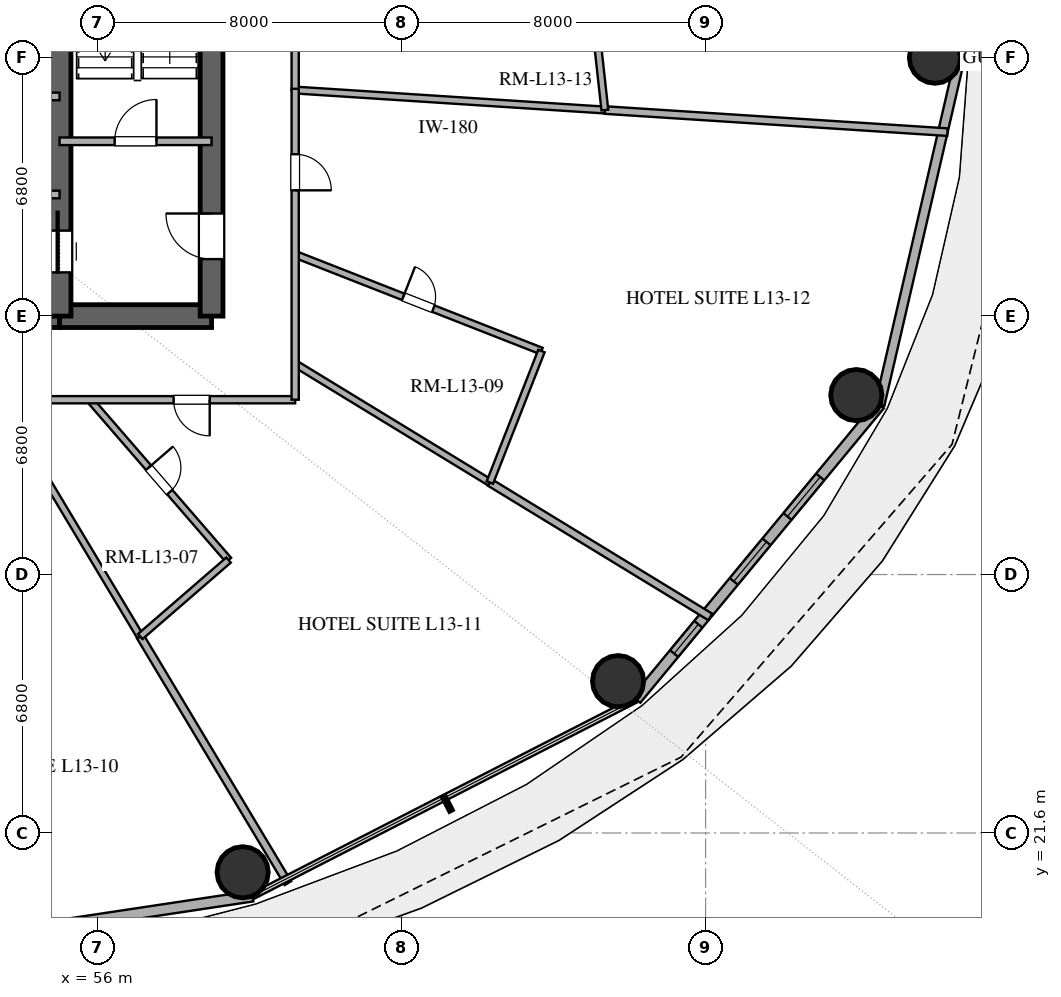
"""IFC4 building model, lengths in metres.
Left out: names, types, materials, properties, quantities, classifications, styles, units other than length and angle.
Written with IfcOpenShell. Run it as: python <this file> out.ifc"""

import sys

from ifc_helpers import new_model, si_unit, direction, frame, frame_2d, origin, origin_2d, place, context, subcontext, project, spatial, rectangle, hollow_circle, extrude, element, fill, save


model = new_model("IFC4")
c1 = context("Model", 3, precision=1e-05, world=origin(), true_north=direction((0.0, 1.0)))
c2 = subcontext(c1, "Body", "Model", "MODEL_VIEW")
j1 = project(units=[si_unit("LENGTHUNIT", "METRE"), si_unit("PLANEANGLEUNIT", "RADIAN")], contexts=[c1])
p1 = place(None, origin())
s1 = spatial("IfcSite", under=j1, at=p1, CompositionType="ELEMENT")
p2 = place(p1, origin())
s2 = spatial("IfcBuilding", under=s1, at=p2, CompositionType="ELEMENT")
p3 = place(p2, frame((0.0, 0.0, 57.0)))
s3 = spatial("IfcBuildingStorey", under=s2, at=p3, CompositionType="ELEMENT", Elevation=57.0)
p4 = place(p3, frame((41.0, 35.2, 0.0), z_axis=(0.0, 0.0, 1.0), x_axis=(1.0, 0.0, 0.0)))
e1 = element("IfcWall", 1, at=p4, inside=s3, PredefinedType="SHEAR", context=c2, shape_type="SweptSolid", body=[
    extrude(rectangle(XDim=14.0, YDim=0.6, at=frame_2d((7.0, 0.0))), origin(), (0.0, 0.0, 1.0), 3.38),
])
p5 = place(p4, frame((6.1, 0.0, 0.0)))
e2 = element("IfcOpeningElement", 2, at=p5, cuts=e1, PredefinedType="OPENING", context=c2, shape_type="SweptSolid", body=[
    extrude(rectangle(XDim=1.8, YDim=2.25, at=frame_2d((0.9, 1.125))), frame((0.0, 0.31, 0.0), z_axis=(0.0, -1.0, 0.0), x_axis=(1.0, 0.0, 0.0)), (0.0, 0.0, 1.0), 0.62),
])
p6 = place(p3, frame((55.0, 35.2, 0.0), z_axis=(0.0, 0.0, 1.0), x_axis=(1.0, 0.0, 0.0)))
e3 = element("IfcWall", 3, at=p6, inside=s3, PredefinedType="SHEAR", context=c2, shape_type="SweptSolid", body=[
    extrude(rectangle(XDim=4.0, YDim=0.6, at=frame_2d((2.0, 0.0))), origin(), (0.0, 0.0, 1.0), 3.38),
])
p7 = place(p3, frame((59.0, 35.2, 0.0), z_axis=(0.0, 0.0, 1.0), x_axis=(0.0, 1.0, 0.0)))
e4 = element("IfcWall", 4, at=p7, inside=s3, PredefinedType="SHEAR", context=c2, shape_type="SweptSolid", body=[
    extrude(rectangle(XDim=13.6, YDim=0.6, at=frame_2d((6.8, 0.0))), origin(), (0.0, 0.0, 1.0), 3.38),
])
p8 = place(p7, frame((1.5, 0.0, 0.0)))
e5 = element("IfcOpeningElement", 5, at=p8, cuts=e4, PredefinedType="OPENING", context=c2, shape_type="SweptSolid", body=[
    extrude(rectangle(XDim=1.2, YDim=2.15, at=frame_2d((0.6, 1.075))), frame((0.0, 0.31, 0.0), z_axis=(0.0, -1.0, 0.0), x_axis=(1.0, 0.0, 0.0)), (0.0, 0.0, 1.0), 0.62),
])
p9 = place(p3, frame((55.0, 35.2, 0.0), z_axis=(0.0, 0.0, 1.0), x_axis=(0.0, 1.0, 0.0)))
e6 = element("IfcWall", 6, at=p9, inside=s3, PredefinedType="SHEAR", context=c2, shape_type="SweptSolid", body=[
    extrude(rectangle(XDim=13.6, YDim=0.6, at=frame_2d((6.8, 0.0))), origin(), (0.0, 0.0, 1.0), 3.38),
])
p10 = place(p9, frame((1.15, 0.0, 0.0)))
e7 = element("IfcOpeningElement", 7, at=p10, cuts=e6, PredefinedType="OPENING", context=c2, shape_type="SweptSolid", body=[
    extrude(rectangle(XDim=1.1, YDim=2.2, at=frame_2d((0.55, 1.1))), frame((0.0, 0.31, 0.0), z_axis=(0.0, -1.0, 0.0), x_axis=(1.0, 0.0, 0.0)), (0.0, 0.0, 1.0), 0.62),
])
for number, where, z_axis, x_axis in (
    (8, (78.035, 42.0, 0.0), (0.0, 0.0, 1.0), (1.0, 0.0, 0.0)),
    (9, (59.818, 20.566, 0.0), (0.0, 0.0, 1.0), (1.0, 0.0, 0.0)),
    (10, (69.697, 25.595, 0.0), (0.0, 0.0, 1.0), (1.0, 0.0, 0.0)),
    (11, (75.966, 33.122, 0.0), (0.0, 0.0, 1.0), (1.0, 0.0, 0.0)),
):
    element("IfcColumn", number, at=place(p3, frame(where, z_axis=z_axis, x_axis=x_axis)), inside=s3, PredefinedType="COLUMN", context=c2, shape_type="SweptSolid", body=[
        extrude(hollow_circle(Radius=0.675, WallThickness=0.036, at=origin_2d()), origin(), (0.0, 0.0, 1.0), 3.38),
    ])
p11 = place(p3, frame((78.696, 42.0, 0.0), z_axis=(0.0, 0.0, 1.0), x_axis=(-0.225454452941, 0.974253709076, 0.0)))
e12 = element("IfcWall", 12, at=p11, inside=s3, PredefinedType="SOLIDWALL", context=c2, shape_type="SweptSolid", body=[
    extrude(rectangle(XDim=9.38, YDim=0.28, at=frame_2d((4.69, 0.0))), origin(), (0.0, 0.0, 1.0), 3.38),
])
p12 = place(p11, frame((6.435, 0.0, 0.0)))
e13 = element("IfcOpeningElement", 13, at=p12, cuts=e12, PredefinedType="OPENING", context=c2, shape_type="SweptSolid", body=[
    extrude(rectangle(XDim=1.4, YDim=2.2, at=frame_2d((0.7, 1.1))), frame((0.0, 0.15, 0.0), z_axis=(0.0, -1.0, 0.0), x_axis=(1.0, 0.0, 0.0)), (0.0, 0.0, 1.0), 0.3),
])
p13 = place(p3, frame((48.0, 18.12, 0.0), z_axis=(0.0, 0.0, 1.0), x_axis=(0.988864835849, 0.148816452121, 0.0)))
e14 = element("IfcWall", 14, at=p13, inside=s3, PredefinedType="SOLIDWALL", context=c2, shape_type="SweptSolid", body=[
    extrude(rectangle(XDim=12.214, YDim=0.28, at=frame_2d((6.107, 0.0))), origin(), (0.0, 0.0, 1.0), 3.38),
])
p14 = place(p13, frame((1.621, 0.0, 0.0)))
e15 = element("IfcOpeningElement", 15, at=p14, cuts=e14, PredefinedType="OPENING", context=c2, shape_type="SweptSolid", body=[
    extrude(rectangle(XDim=1.6, YDim=2.25, at=frame_2d((0.8, 1.125))), frame((0.0, 0.15, 0.0), z_axis=(0.0, -1.0, 0.0), x_axis=(1.0, 0.0, 0.0)), (0.0, 0.0, 1.0), 0.3),
])
p15 = place(p3, frame((70.174, 25.114, 0.0), z_axis=(0.0, 0.0, 1.0), x_axis=(0.637296809613, 0.770618437657, 0.0)))
e16 = element("IfcWall", 16, at=p15, inside=s3, PredefinedType="SOLIDWALL", context=c2, shape_type="SweptSolid", body=[
    extrude(rectangle(XDim=10.053, YDim=0.28, at=frame_2d((5.027, 0.0))), origin(), (0.0, 0.0, 1.0), 3.38),
])
p16 = place(p15, frame((1.565, 0.0, 0.85)))
e17 = element("IfcOpeningElement", 17, at=p16, cuts=e16, PredefinedType="OPENING", context=c2, shape_type="SweptSolid", body=[
    extrude(rectangle(XDim=1.0, YDim=1.8, at=frame_2d((0.5, 0.9))), frame((0.0, 0.15, 0.0), z_axis=(0.0, -1.0, 0.0), x_axis=(1.0, 0.0, 0.0)), (0.0, 0.0, 1.0), 0.3),
])
p17 = place(p15, frame((4.03, 0.0, 0.85)))
e18 = element("IfcOpeningElement", 18, at=p17, cuts=e16, PredefinedType="OPENING", context=c2, shape_type="SweptSolid", body=[
    extrude(rectangle(XDim=1.35, YDim=1.8, at=frame_2d((0.675, 0.9))), frame((0.0, 0.15, 0.0), z_axis=(0.0, -1.0, 0.0), x_axis=(1.0, 0.0, 0.0)), (0.0, 0.0, 1.0), 0.3),
])
p18 = place(p15, frame((6.246, 0.0, 0.85)))
e19 = element("IfcOpeningElement", 19, at=p18, cuts=e16, PredefinedType="OPENING", context=c2, shape_type="SweptSolid", body=[
    extrude(rectangle(XDim=1.35, YDim=1.8, at=frame_2d((0.675, 0.9))), frame((0.0, 0.15, 0.0), z_axis=(0.0, -1.0, 0.0), x_axis=(1.0, 0.0, 0.0)), (0.0, 0.0, 1.0), 0.3),
])
p19 = place(p3, frame((76.581, 32.862, 0.0), z_axis=(0.0, 0.0, 1.0), x_axis=(0.225454452941, 0.974253709076, 0.0)))
e20 = element("IfcWall", 20, at=p19, inside=s3, PredefinedType="SOLIDWALL", context=c2, shape_type="SweptSolid", body=[
    extrude(rectangle(XDim=9.38, YDim=0.25, at=frame_2d((4.69, 0.0))), origin(), (0.0, 0.0, 1.0), 3.38),
])
p20 = place(p3, frame((55.0, 39.8, 0.0), z_axis=(0.0, 0.0, 1.0), x_axis=(1.0, 0.0, 0.0)))
e21 = element("IfcWall", 21, at=p20, inside=s3, PredefinedType="SOLIDWALL", context=c2, shape_type="SweptSolid", body=[
    extrude(rectangle(XDim=4.0, YDim=0.2, at=frame_2d((2.0, 0.0))), origin(), (0.0, 0.0, 1.0), 2.74),
])
p21 = place(p20, frame((1.45, 0.0, 0.0)))
e22 = element("IfcOpeningElement", 22, at=p21, cuts=e21, PredefinedType="OPENING", context=c2, shape_type="SweptSolid", body=[
    extrude(rectangle(XDim=1.1, YDim=2.15, at=frame_2d((0.55, 1.075))), frame((0.0, 0.11, 0.0), z_axis=(0.0, -1.0, 0.0), x_axis=(1.0, 0.0, 0.0)), (0.0, 0.0, 1.0), 0.22),
])
for number, where, z_axis, x_axis in (
    (23, (52.05, 38.4, 0.0), (0.0, 0.0, 1.0), (1.0, 0.0, 0.0)),
    (24, (52.05, 40.98, 0.0), (0.0, 0.0, 1.0), (1.0, 0.0, 0.0)),
):
    element("IfcWall", number, at=place(p3, frame(where, z_axis=z_axis, x_axis=x_axis)), inside=s3, PredefinedType="SOLIDWALL", context=c2, shape_type="SweptSolid", body=[
        extrude(rectangle(XDim=2.95, YDim=0.2, at=frame_2d((1.475, 0.0))), origin(), (0.0, 0.0, 1.0), 2.74),
    ])
p22 = place(p3, frame((78.364, 40.041, 0.0), z_axis=(0.0, 0.0, 1.0), x_axis=(-0.997924020497, 0.064402246198, 0.0)))
e25 = element("IfcWall", 25, at=p22, inside=s3, PredefinedType="PARTITIONING", context=c2, shape_type="SweptSolid", body=[
    extrude(rectangle(XDim=9.034, YDim=0.2, at=frame_2d((4.517, 0.0))), origin(), (0.0, 0.0, 1.0), 2.74),
])
p23 = place(p3, frame((69.349, 40.622, 0.0), z_axis=(0.0, 0.0, 1.0), x_axis=(-0.997924317455, 0.064397644621, 0.0)))
e26 = element("IfcWall", 26, at=p23, inside=s3, PredefinedType="PLUMBINGWALL", context=c2, shape_type="SweptSolid", body=[
    extrude(rectangle(XDim=8.166, YDim=0.18, at=frame_2d((4.083, 0.0))), origin(), (0.0, 0.0, 1.0), 2.74),
])
p24 = place(p3, frame((61.01, 20.281, 0.0), z_axis=(0.0, 0.0, 1.0), x_axis=(-0.513892719639, 0.857854458928, 0.0)))
e27 = element("IfcWall", 27, at=p24, inside=s3, PredefinedType="PARTITIONING", context=c2, shape_type="SweptSolid", body=[
    extrude(rectangle(XDim=7.563, YDim=0.2, at=frame_2d((3.781, 0.0))), origin(), (0.0, 0.0, 1.0), 2.74),
])
p25 = place(p3, frame((57.124, 26.769, 0.0), z_axis=(0.0, 0.0, 1.0), x_axis=(-0.513872793929, 0.857866394994, 0.0)))
e28 = element("IfcWall", 28, at=p25, inside=s3, PredefinedType="PLUMBINGWALL", context=c2, shape_type="SweptSolid", body=[
    extrude(rectangle(XDim=7.263, YDim=0.18, at=frame_2d((3.632, 0.0))), origin(), (0.0, 0.0, 1.0), 2.74),
])
p26 = place(p3, frame((61.2, 36.823, 0.0), z_axis=(0.0, 0.0, 1.0), x_axis=(0.930954264603, -0.365135806539, 0.0)))
e29 = element("IfcWall", 29, at=p26, inside=s3, PredefinedType="PLUMBINGWALL", context=c2, shape_type="SweptSolid", body=[
    extrude(rectangle(XDim=6.961, YDim=0.18, at=frame_2d((3.48, 0.0))), origin(), (0.0, 0.0, 1.0), 2.74),
])
p27 = place(p26, frame((3.055, 0.0, 0.0)))
e30 = element("IfcOpeningElement", 30, at=p27, cuts=e29, PredefinedType="OPENING", context=c2, shape_type="SweptSolid", body=[
    extrude(rectangle(XDim=0.85, YDim=2.1, at=frame_2d((0.425, 1.05))), frame((0.0, 0.1, 0.0), z_axis=(0.0, -1.0, 0.0), x_axis=(1.0, 0.0, 0.0)), (0.0, 0.0, 1.0), 0.2),
])
p28 = place(p3, frame((72.123, 27.284, 0.0), z_axis=(0.0, 0.0, 1.0), x_axis=(-0.853686673388, 0.520786965735, 0.0)))
e31 = element("IfcWall", 31, at=p28, inside=s3, PredefinedType="PARTITIONING", context=c2, shape_type="SweptSolid", body=[
    extrude(rectangle(XDim=6.793, YDim=0.2, at=frame_2d((3.396, 0.0))), origin(), (0.0, 0.0, 1.0), 2.74),
])
p29 = place(p3, frame((66.323, 30.822, 0.0), z_axis=(0.0, 0.0, 1.0), x_axis=(-0.853693843866, 0.52077521153, 0.0)))
e32 = element("IfcWall", 32, at=p29, inside=s3, PredefinedType="PLUMBINGWALL", context=c2, shape_type="SweptSolid", body=[
    extrude(rectangle(XDim=6.002, YDim=0.18, at=frame_2d((3.001, 0.0))), origin(), (0.0, 0.0, 1.0), 2.74),
])
p30 = place(p3, frame((55.794, 33.0, 0.0), z_axis=(0.0, 0.0, 1.0), x_axis=(0.654630697525, -0.755948840767, 0.0)))
e33 = element("IfcWall", 33, at=p30, inside=s3, PredefinedType="PLUMBINGWALL", context=c2, shape_type="SweptSolid", body=[
    extrude(rectangle(XDim=5.581, YDim=0.18, at=frame_2d((2.791, 0.0))), origin(), (0.0, 0.0, 1.0), 2.74),
])
p31 = place(p30, frame((2.365, 0.0, 0.0)))
e34 = element("IfcOpeningElement", 34, at=p31, cuts=e33, PredefinedType="OPENING", context=c2, shape_type="SweptSolid", body=[
    extrude(rectangle(XDim=0.85, YDim=2.1, at=frame_2d((0.425, 1.05))), frame((0.0, 0.1, 0.0), z_axis=(0.0, -1.0, 0.0), x_axis=(1.0, 0.0, 0.0)), (0.0, 0.0, 1.0), 0.2),
])
p32 = place(p3, frame((61.2, 33.0, 0.0), z_axis=(0.0, 0.0, 1.0), x_axis=(-1.0, 0.0, 0.0)))
e35 = element("IfcWall", 35, at=p32, inside=s3, PredefinedType="PARTITIONING", context=c2, shape_type="SweptSolid", body=[
    extrude(rectangle(XDim=7.846, YDim=0.19, at=frame_2d((3.923, 0.0))), origin(), (0.0, 0.0, 1.0), 2.74),
])
p33 = place(p32, frame((2.249, 0.0, 0.0)))
e36 = element("IfcOpeningElement", 36, at=p33, cuts=e35, PredefinedType="OPENING", context=c2, shape_type="SweptSolid", body=[
    extrude(rectangle(XDim=0.95, YDim=2.15, at=frame_2d((0.475, 1.075))), frame((0.0, 0.105, 0.0), z_axis=(0.0, -1.0, 0.0), x_axis=(1.0, 0.0, 0.0)), (0.0, 0.0, 1.0), 0.21),
])
p34 = place(p3, frame((61.2, 51.0, 0.0), z_axis=(0.0, 0.0, 1.0), x_axis=(0.0, -1.0, 0.0)))
e37 = element("IfcWall", 37, at=p34, inside=s3, PredefinedType="PARTITIONING", context=c2, shape_type="SweptSolid", body=[
    extrude(rectangle(XDim=9.852, YDim=0.19, at=frame_2d((4.926, 0.0))), origin(), (0.0, 0.0, 1.0), 2.74),
])
p35 = place(p34, frame((4.859, 0.0, 0.0)))
e38 = element("IfcOpeningElement", 38, at=p35, cuts=e37, PredefinedType="OPENING", context=c2, shape_type="SweptSolid", body=[
    extrude(rectangle(XDim=0.95, YDim=2.15, at=frame_2d((0.475, 1.075))), frame((0.0, 0.105, 0.0), z_axis=(0.0, -1.0, 0.0), x_axis=(1.0, 0.0, 0.0)), (0.0, 0.0, 1.0), 0.21),
])
p36 = place(p3, frame((61.2, 41.18, 0.0), z_axis=(0.0, 0.0, 1.0), x_axis=(0.0, -1.0, 0.0)))
e39 = element("IfcWall", 39, at=p36, inside=s3, PredefinedType="PARTITIONING", context=c2, shape_type="SweptSolid", body=[
    extrude(rectangle(XDim=8.18, YDim=0.19, at=frame_2d((4.09, 0.0))), origin(), (0.0, 0.0, 1.0), 2.74),
])
p37 = place(p36, frame((1.721, 0.0, 0.0)))
e40 = element("IfcOpeningElement", 40, at=p37, cuts=e39, PredefinedType="OPENING", context=c2, shape_type="SweptSolid", body=[
    extrude(rectangle(XDim=0.95, YDim=2.15, at=frame_2d((0.475, 1.075))), frame((0.0, 0.105, 0.0), z_axis=(0.0, -1.0, 0.0), x_axis=(1.0, 0.0, 0.0)), (0.0, 0.0, 1.0), 0.21),
])
p38 = place(p3, frame((67.68, 34.281, 0.0), z_axis=(0.0, 0.0, 1.0), x_axis=(-0.365174619735, -0.930939040486, 0.0)))
e41 = element("IfcWall", 41, at=p38, inside=s3, PredefinedType="PLUMBINGWALL", context=c2, shape_type="SweptSolid", body=[
    extrude(rectangle(XDim=3.716, YDim=0.18, at=frame_2d((1.858, 0.0))), origin(), (0.0, 0.0, 1.0), 2.74),
])
p39 = place(p3, frame((68.944, 44.304, 0.0), z_axis=(0.0, 0.0, 1.0), x_axis=(0.109360669908, -0.994002134745, 0.0)))
e42 = element("IfcWall", 42, at=p39, inside=s3, PredefinedType="PLUMBINGWALL", context=c2, shape_type="SweptSolid", body=[
    extrude(rectangle(XDim=3.704, YDim=0.18, at=frame_2d((1.852, 0.0))), origin(), (0.0, 0.0, 1.0), 2.74),
])
p40 = place(p3, frame((59.447, 28.781, 0.0), z_axis=(0.0, 0.0, 1.0), x_axis=(-0.755927521829, -0.654655315217, 0.0)))
e43 = element("IfcWall", 43, at=p40, inside=s3, PredefinedType="PLUMBINGWALL", context=c2, shape_type="SweptSolid", body=[
    extrude(rectangle(XDim=3.074, YDim=0.18, at=frame_2d((1.537, 0.0))), origin(), (0.0, 0.0, 1.0), 2.74),
])
p41 = place(p16, origin())
e44 = element("IfcWindow", 44, at=p41, inside=s3, PartitioningType="SINGLE_PANEL", PredefinedType="WINDOW", context=c2, shape_type="SweptSolid", body=[
    extrude(rectangle(XDim=1.0, YDim=1.8, at=frame_2d((0.5, 0.9))), frame((0.0, 0.03, 0.0), z_axis=(0.0, -1.0, 0.0), x_axis=(1.0, 0.0, 0.0)), (0.0, 0.0, 1.0), 0.06),
])
fill(e17, e44)
p42 = place(p17, origin())
e45 = element("IfcWindow", 45, at=p42, inside=s3, PartitioningType="SINGLE_PANEL", PredefinedType="WINDOW", context=c2, shape_type="SweptSolid", body=[
    extrude(rectangle(XDim=1.35, YDim=1.8, at=frame_2d((0.675, 0.9))), frame((0.0, 0.03, 0.0), z_axis=(0.0, -1.0, 0.0), x_axis=(1.0, 0.0, 0.0)), (0.0, 0.0, 1.0), 0.06),
])
fill(e18, e45)
p43 = place(p18, origin())
e46 = element("IfcWindow", 46, at=p43, inside=s3, PartitioningType="SINGLE_PANEL", PredefinedType="WINDOW", context=c2, shape_type="SweptSolid", body=[
    extrude(rectangle(XDim=1.35, YDim=1.8, at=frame_2d((0.675, 0.9))), frame((0.0, 0.03, 0.0), z_axis=(0.0, -1.0, 0.0), x_axis=(1.0, 0.0, 0.0)), (0.0, 0.0, 1.0), 0.06),
])
fill(e19, e46)
p44 = place(p10, origin())
e47 = element("IfcDoor", 47, at=p44, inside=s3, OperationType="SLIDING_TO_RIGHT", PredefinedType="DOOR", context=c2, shape_type="SweptSolid", body=[
    extrude(rectangle(XDim=1.1, YDim=2.2, at=frame_2d((0.55, 1.1))), frame((0.0, 0.025, 0.0), z_axis=(0.0, -1.0, 0.0), x_axis=(1.0, 0.0, 0.0)), (0.0, 0.0, 1.0), 0.05),
])
fill(e7, e47)
p45 = place(p8, origin())
e48 = element("IfcDoor", 48, at=p45, inside=s3, OperationType="SINGLE_SWING_RIGHT", PredefinedType="DOOR", context=c2, shape_type="SweptSolid", body=[
    extrude(rectangle(XDim=1.2, YDim=2.15, at=frame_2d((0.6, 1.075))), frame((0.0, 0.025, 0.0), z_axis=(0.0, -1.0, 0.0), x_axis=(1.0, 0.0, 0.0)), (0.0, 0.0, 1.0), 0.05),
])
fill(e5, e48)
p46 = place(p21, origin())
e49 = element("IfcDoor", 49, at=p46, inside=s3, OperationType="SINGLE_SWING_RIGHT", PredefinedType="DOOR", context=c2, shape_type="SweptSolid", body=[
    extrude(rectangle(XDim=1.1, YDim=2.15, at=frame_2d((0.55, 1.075))), frame((0.0, 0.025, 0.0), z_axis=(0.0, -1.0, 0.0), x_axis=(1.0, 0.0, 0.0)), (0.0, 0.0, 1.0), 0.05),
])
fill(e22, e49)
p47 = place(p27, origin())
e50 = element("IfcDoor", 50, at=p47, inside=s3, OperationType="SINGLE_SWING_LEFT", PredefinedType="DOOR", context=c2, shape_type="SweptSolid", body=[
    extrude(rectangle(XDim=0.85, YDim=2.1, at=frame_2d((0.425, 1.05))), frame((0.0, 0.025, 0.0), z_axis=(0.0, -1.0, 0.0), x_axis=(1.0, 0.0, 0.0)), (0.0, 0.0, 1.0), 0.05),
])
fill(e30, e50)
p48 = place(p31, origin())
e51 = element("IfcDoor", 51, at=p48, inside=s3, OperationType="SINGLE_SWING_LEFT", PredefinedType="DOOR", context=c2, shape_type="SweptSolid", body=[
    extrude(rectangle(XDim=0.85, YDim=2.1, at=frame_2d((0.425, 1.05))), frame((0.0, 0.025, 0.0), z_axis=(0.0, -1.0, 0.0), x_axis=(1.0, 0.0, 0.0)), (0.0, 0.0, 1.0), 0.05),
])
fill(e34, e51)
p49 = place(p33, origin())
e52 = element("IfcDoor", 52, at=p49, inside=s3, OperationType="SINGLE_SWING_LEFT", PredefinedType="DOOR", context=c2, shape_type="SweptSolid", body=[
    extrude(rectangle(XDim=0.95, YDim=2.15, at=frame_2d((0.475, 1.075))), frame((0.0, 0.025, 0.0), z_axis=(0.0, -1.0, 0.0), x_axis=(1.0, 0.0, 0.0)), (0.0, 0.0, 1.0), 0.05),
])
fill(e36, e52)
p50 = place(p37, origin())
e53 = element("IfcDoor", 53, at=p50, inside=s3, OperationType="SINGLE_SWING_RIGHT", PredefinedType="DOOR", context=c2, shape_type="SweptSolid", body=[
    extrude(rectangle(XDim=0.95, YDim=2.15, at=frame_2d((0.475, 1.075))), frame((0.0, 0.025, 0.0), z_axis=(0.0, -1.0, 0.0), x_axis=(1.0, 0.0, 0.0)), (0.0, 0.0, 1.0), 0.05),
])
fill(e40, e53)
save(model, sys.argv[1])
